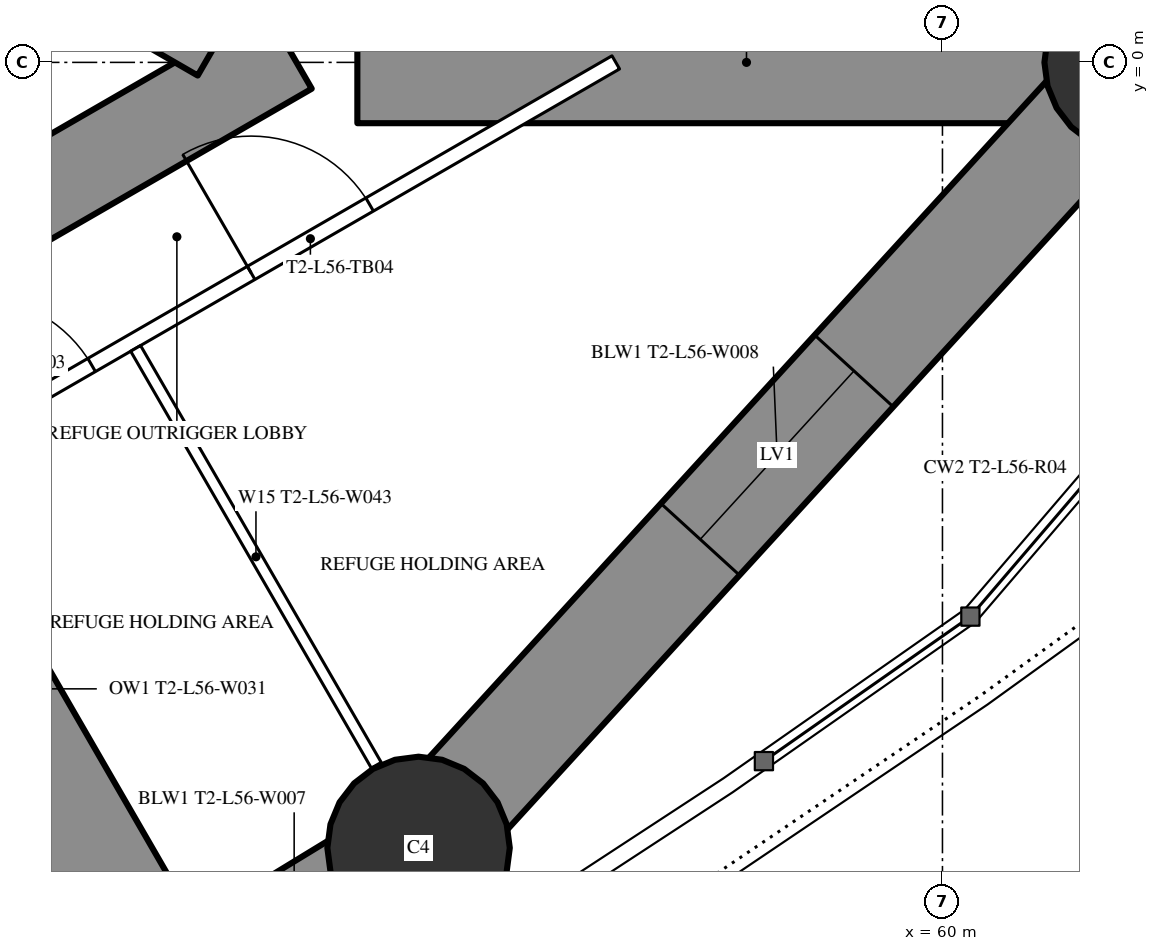
"""IFC4 building model, lengths in metres.
Left out: names, types, materials, properties, quantities, classifications, styles, units other than length and angle.
Written with IfcOpenShell. Run it as: python <this file> out.ifc"""

import sys

from ifc_helpers import new_model, si_unit, direction, frame, frame_2d, origin, origin_2d, place, context, subcontext, project, spatial, rectangle, circle, extrude, element, fill, save


model = new_model("IFC4")
c1 = context("Model", 3, precision=1e-05, world=origin(), true_north=direction((0.0, 1.0)))
c2 = subcontext(c1, "Body", "Model", "MODEL_VIEW")
j1 = project(units=[si_unit("LENGTHUNIT", "METRE"), si_unit("PLANEANGLEUNIT", "RADIAN")], contexts=[c1])
p1 = place(None, origin())
s1 = spatial("IfcSite", under=j1, at=p1, CompositionType="ELEMENT")
p2 = place(p1, origin())
s2 = spatial("IfcBuilding", under=s1, at=p2, CompositionType="ELEMENT")
p3 = place(p2, frame((0.0, 0.0, 210.3)))
s3 = spatial("IfcBuildingStorey", under=s2, at=p3, CompositionType="ELEMENT", Elevation=210.3)
for number, where, z_axis, x_axis in (
    (1, (62.542, 0.0, 0.0), (0.0, 0.0, 1.0), (1.0, 0.0, 0.0)),
    (2, (53.108, -10.334, 0.0), (0.0, 0.0, 1.0), (1.0, 0.0, 0.0)),
):
    element("IfcColumn", number, at=place(p3, frame(where, z_axis=z_axis, x_axis=x_axis)), inside=s3, PredefinedType="COLUMN", context=c2, shape_type="SweptSolid", body=[
        extrude(circle(Radius=1.2, at=origin_2d()), origin(), (0.0, 0.0, 1.0), 5.0),
    ])
p4 = place(p3, frame((27.2, -13.8, 0.0), z_axis=(0.0, 0.0, 1.0), x_axis=(0.866027159892, 0.499996958321, 0.0)))
e3 = element("IfcWall", 3, at=p4, inside=s3, PredefinedType="SHEAR", context=c2, shape_type="SweptSolid", body=[
    extrude(rectangle(XDim=27.947, YDim=1.2, at=frame_2d((13.973, 0.0))), origin(), (0.0, 0.0, 1.0), 5.0),
])
p5 = place(p4, frame((6.5, 0.0, 0.0)))
e4 = element("IfcOpeningElement", 4, at=p5, cuts=e3, PredefinedType="OPENING", context=c2, shape_type="SweptSolid", body=[
    extrude(rectangle(XDim=1.0, YDim=2.2, at=frame_2d((0.5, 1.1))), frame((0.0, 0.61, 0.0), z_axis=(0.0, -1.0, 0.0), x_axis=(1.0, 0.0, 0.0)), (0.0, 0.0, 1.0), 1.22),
])
p6 = place(p4, frame((13.568, 0.0, 0.0)))
e5 = element("IfcOpeningElement", 5, at=p6, cuts=e3, PredefinedType="OPENING", context=c2, shape_type="SweptSolid", body=[
    extrude(rectangle(XDim=1.8, YDim=2.2, at=frame_2d((0.9, 1.1))), frame((0.0, 0.61, 0.0), z_axis=(0.0, -1.0, 0.0), x_axis=(1.0, 0.0, 0.0)), (0.0, 0.0, 1.0), 1.22),
])
p7 = place(p3, frame((27.2, 13.8, 0.0), z_axis=(0.0, 0.0, 1.0), x_axis=(0.866024515034, -0.500001539357, 0.0)))
e6 = element("IfcWall", 6, at=p7, inside=s3, PredefinedType="SHEAR", context=c2, shape_type="SweptSolid", body=[
    extrude(rectangle(XDim=26.907, YDim=1.2, at=frame_2d((13.454, 0.0))), origin(), (0.0, 0.0, 1.0), 5.0),
])
p8 = place(p7, frame((6.5, 0.0, 0.0)))
e7 = element("IfcOpeningElement", 7, at=p8, cuts=e6, PredefinedType="OPENING", context=c2, shape_type="SweptSolid", body=[
    extrude(rectangle(XDim=1.0, YDim=2.2, at=frame_2d((0.5, 1.1))), frame((0.0, 0.61, 0.0), z_axis=(0.0, -1.0, 0.0), x_axis=(1.0, 0.0, 0.0)), (0.0, 0.0, 1.0), 1.22),
])
p9 = place(p7, frame((13.568, 0.0, 0.0)))
e8 = element("IfcOpeningElement", 8, at=p9, cuts=e6, PredefinedType="OPENING", context=c2, shape_type="SweptSolid", body=[
    extrude(rectangle(XDim=1.8, YDim=2.2, at=frame_2d((0.9, 1.1))), frame((0.0, 0.61, 0.0), z_axis=(0.0, -1.0, 0.0), x_axis=(1.0, 0.0, 0.0)), (0.0, 0.0, 1.0), 1.22),
])
p10 = place(p3, frame((45.111, -4.152, 0.0), z_axis=(0.0, 0.0, 1.0), x_axis=(0.499986466662, -0.86603321712, 0.0)))
e9 = element("IfcWall", 9, at=p10, inside=s3, PredefinedType="SHEAR", context=c2, shape_type="SweptSolid", body=[
    extrude(rectangle(XDim=9.446, YDim=1.6, at=frame_2d((4.723, 0.0))), origin(), (0.0, 0.0, 1.0), 5.0),
])
p11 = place(p10, frame((0.3, 0.0, 0.0)))
e10 = element("IfcOpeningElement", 10, at=p11, cuts=e9, PredefinedType="OPENING", context=c2, shape_type="SweptSolid", body=[
    extrude(rectangle(XDim=1.0, YDim=2.2, at=frame_2d((0.5, 1.1))), frame((0.0, 0.81, 0.0), z_axis=(0.0, -1.0, 0.0), x_axis=(1.0, 0.0, 0.0)), (0.0, 0.0, 1.0), 1.62),
])
p12 = place(p3, frame((52.302, 0.0, 0.0), z_axis=(0.0, 0.0, 1.0), x_axis=(1.0, 0.0, 0.0)))
e11 = element("IfcWall", 11, at=p12, inside=s3, PredefinedType="SHEAR", context=c2, shape_type="SweptSolid", body=[
    extrude(rectangle(XDim=10.239, YDim=1.6, at=frame_2d((5.12, 0.0))), origin(), (0.0, 0.0, 1.0), 5.0),
])
p13 = place(p3, frame((49.834, -12.332, 0.0), z_axis=(0.0, 0.0, 1.0), x_axis=(0.853604257265, 0.520922040212, 0.0)))
e12 = element("IfcWall", 12, at=p13, inside=s3, PredefinedType="SHEAR", context=c2, shape_type="SweptSolid", body=[
    extrude(rectangle(XDim=3.835, YDim=1.4, at=frame_2d((1.917, 0.0))), origin(), (0.0, 0.0, 1.0), 5.0),
])
p14 = place(p3, frame((53.108, -10.334, 0.0), z_axis=(0.0, 0.0, 1.0), x_axis=(0.674209372947, 0.738540263919, 0.0)))
e13 = element("IfcWall", 13, at=p14, inside=s3, PredefinedType="SHEAR", context=c2, shape_type="SweptSolid", body=[
    extrude(rectangle(XDim=13.992, YDim=1.4, at=frame_2d((6.996, 0.0))), origin(), (0.0, 0.0, 1.0), 5.0),
])
p15 = place(p14, frame((5.496, 0.0, 0.6)))
e14 = element("IfcOpeningElement", 14, at=p15, cuts=e13, PredefinedType="OPENING", context=c2, shape_type="SweptSolid", body=[
    extrude(rectangle(XDim=3.0, YDim=1.2, at=frame_2d((1.5, 0.6))), frame((0.0, 0.71, 0.0), z_axis=(0.0, -1.0, 0.0), x_axis=(1.0, 0.0, 0.0)), (0.0, 0.0, 1.0), 1.42),
])
p16 = place(p3, frame((62.542, 0.0, 0.0), z_axis=(0.0, 0.0, 1.0), x_axis=(-0.674209372947, 0.738540263919, 0.0)))
e15 = element("IfcWall", 15, at=p16, inside=s3, PredefinedType="SHEAR", context=c2, shape_type="SweptSolid", body=[
    extrude(rectangle(XDim=13.992, YDim=1.4, at=frame_2d((6.996, 0.0))), origin(), (0.0, 0.0, 1.0), 5.0),
])
p17 = place(p16, frame((5.496, 0.0, 0.6)))
e16 = element("IfcOpeningElement", 16, at=p17, cuts=e15, PredefinedType="OPENING", context=c2, shape_type="SweptSolid", body=[
    extrude(rectangle(XDim=3.0, YDim=1.2, at=frame_2d((1.5, 0.6))), frame((0.0, 0.71, 0.0), z_axis=(0.0, -1.0, 0.0), x_axis=(1.0, 0.0, 0.0)), (0.0, 0.0, 1.0), 1.42),
])
p18 = place(p3, frame((28.959, -15.44, 0.0), z_axis=(0.0, 0.0, 1.0), x_axis=(0.866025227435, 0.500000305447, 0.0)))
e17 = element("IfcWall", 17, at=p18, inside=s3, PredefinedType="PARTITIONING", context=c2, shape_type="SweptSolid", body=[
    extrude(rectangle(XDim=30.88, YDim=0.2, at=frame_2d((15.44, 0.0))), origin(), (0.0, 0.0, 1.0), 4.75),
])
p19 = place(p18, frame((6.994, 0.0, 0.0)))
e18 = element("IfcOpeningElement", 18, at=p19, cuts=e17, PredefinedType="OPENING", context=c2, shape_type="SweptSolid", body=[
    extrude(rectangle(XDim=2.0, YDim=2.4, at=frame_2d((1.0, 1.2))), frame((0.0, 0.11, 0.0), z_axis=(0.0, -1.0, 0.0), x_axis=(1.0, 0.0, 0.0)), (0.0, 0.0, 1.0), 0.22),
])
p20 = place(p18, frame((16.36, 0.0, 0.0)))
e19 = element("IfcOpeningElement", 19, at=p20, cuts=e17, PredefinedType="OPENING", context=c2, shape_type="SweptSolid", body=[
    extrude(rectangle(XDim=1.8, YDim=2.2, at=frame_2d((0.9, 1.1))), frame((0.0, 0.11, 0.0), z_axis=(0.0, -1.0, 0.0), x_axis=(1.0, 0.0, 0.0)), (0.0, 0.0, 1.0), 0.22),
])
p21 = place(p18, frame((21.118, 0.0, 0.0)))
e20 = element("IfcOpeningElement", 20, at=p21, cuts=e17, PredefinedType="OPENING", context=c2, shape_type="SweptSolid", body=[
    extrude(rectangle(XDim=1.8, YDim=2.2, at=frame_2d((0.9, 1.1))), frame((0.0, 0.11, 0.0), z_axis=(0.0, -1.0, 0.0), x_axis=(1.0, 0.0, 0.0)), (0.0, 0.0, 1.0), 0.22),
])
p22 = place(p18, frame((25.341, 0.0, 0.0)))
e21 = element("IfcOpeningElement", 21, at=p22, cuts=e17, PredefinedType="OPENING", context=c2, shape_type="SweptSolid", body=[
    extrude(rectangle(XDim=1.8, YDim=2.2, at=frame_2d((0.9, 1.1))), frame((0.0, 0.11, 0.0), z_axis=(0.0, -1.0, 0.0), x_axis=(1.0, 0.0, 0.0)), (0.0, 0.0, 1.0), 0.22),
])
p23 = place(p3, frame((49.385, -3.763, 0.0), z_axis=(0.0, 0.0, 1.0), x_axis=(0.499999447814, -0.866025722589, 0.0)))
e22 = element("IfcWall", 22, at=p23, inside=s3, PredefinedType="PARTITIONING", context=c2, shape_type="SweptSolid", body=[
    extrude(rectangle(XDim=6.333, YDim=0.15, at=frame_2d((3.166, 0.0))), origin(), (0.0, 0.0, 1.0), 3.85),
])
p24 = place(p15, origin())
e23 = element("IfcWindow", 23, at=p24, inside=s3, PartitioningType="SINGLE_PANEL", PredefinedType="WINDOW", context=c2, shape_type="SweptSolid", body=[
    extrude(rectangle(XDim=3.0, YDim=1.2, at=frame_2d((1.5, 0.6))), frame((0.0, 0.03, 0.0), z_axis=(0.0, -1.0, 0.0), x_axis=(1.0, 0.0, 0.0)), (0.0, 0.0, 1.0), 0.06),
])
fill(e14, e23)
p25 = place(p21, origin())
e24 = element("IfcDoor", 24, at=p25, inside=s3, OperationType="DOUBLE_DOOR_SINGLE_SWING", PredefinedType="DOOR", context=c2, shape_type="SweptSolid", body=[
    extrude(rectangle(XDim=1.8, YDim=2.2, at=frame_2d((0.9, 1.1))), frame((0.0, 0.025, 0.0), z_axis=(0.0, -1.0, 0.0), x_axis=(1.0, 0.0, 0.0)), (0.0, 0.0, 1.0), 0.05),
])
fill(e20, e24)
p26 = place(p22, origin())
e25 = element("IfcDoor", 25, at=p26, inside=s3, OperationType="DOUBLE_DOOR_SINGLE_SWING", PredefinedType="DOOR", context=c2, shape_type="SweptSolid", body=[
    extrude(rectangle(XDim=1.8, YDim=2.2, at=frame_2d((0.9, 1.1))), frame((0.0, 0.025, 0.0), z_axis=(0.0, -1.0, 0.0), x_axis=(1.0, 0.0, 0.0)), (0.0, 0.0, 1.0), 0.05),
])
fill(e21, e25)
save(model, sys.argv[1])
